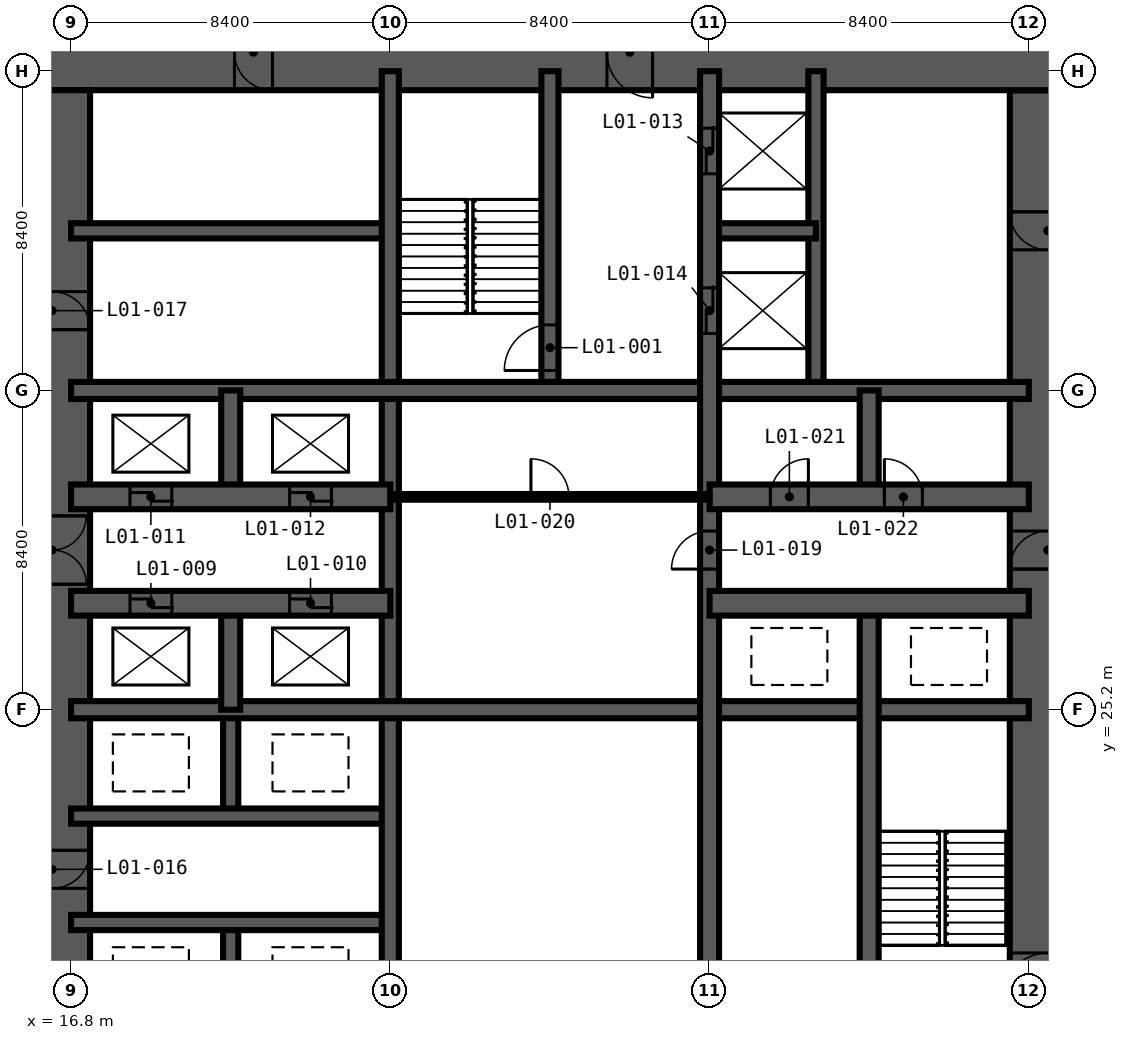
"""IFC4 building model, lengths in metres.
Left out: names, types, materials, properties, quantities, classifications, styles, units other than length and angle.
Written with IfcOpenShell. Run it as: python <this file> out.ifc"""

import sys

from ifc_helpers import new_model, si_unit, direction, frame, frame_2d, origin, place, context, subcontext, project, spatial, rectangle, extrude, element, fill, save


model = new_model("IFC4")
c1 = context("Model", 3, precision=1e-05, world=origin(), true_north=direction((0.0, 1.0)))
c2 = subcontext(c1, "Body", "Model", "MODEL_VIEW")
j1 = project(units=[si_unit("LENGTHUNIT", "METRE"), si_unit("PLANEANGLEUNIT", "RADIAN")], contexts=[c1])
p1 = place(None, origin())
s1 = spatial("IfcSite", under=j1, at=p1, CompositionType="ELEMENT")
p2 = place(p1, origin())
s2 = spatial("IfcBuilding", under=s1, at=p2, CompositionType="ELEMENT")
p3 = place(p2, frame((0.0, 0.0, 6.0)))
s3 = spatial("IfcBuildingStorey", under=s2, at=p3, CompositionType="ELEMENT", Elevation=6.0)
p4 = place(p3, frame((42.5, 17.3, -0.3), z_axis=(0.0, 0.0, 1.0), x_axis=(0.0, 1.0, 0.0)))
e1 = element("IfcWall", 1, at=p4, inside=s3, PredefinedType="SHEAR", context=c2, shape_type="SweptSolid", body=[
    extrude(rectangle(XDim=24.2, YDim=2.0, at=frame_2d((12.1, 0.0))), origin(), (0.0, 0.0, 1.0), 6.0),
])
p5 = place(p4, frame((0.3, 0.0, 0.3)))
e2 = element("IfcOpeningElement", 2, at=p5, cuts=e1, PredefinedType="OPENING", context=c2, shape_type="SweptSolid", body=[
    extrude(rectangle(XDim=1.2, YDim=2.2, at=frame_2d((0.6, 1.1))), frame((0.0, 1.01, 0.0), z_axis=(0.0, -1.0, 0.0), x_axis=(1.0, 0.0, 0.0)), (0.0, 0.0, 1.0), 2.02),
])
p6 = place(p4, frame((11.6, 0.0, 0.3)))
e3 = element("IfcOpeningElement", 3, at=p6, cuts=e1, PredefinedType="OPENING", context=c2, shape_type="SweptSolid", body=[
    extrude(rectangle(XDim=1.0, YDim=2.1, at=frame_2d((0.5, 1.05))), frame((0.0, 1.01, 0.0), z_axis=(0.0, -1.0, 0.0), x_axis=(1.0, 0.0, 0.0)), (0.0, 0.0, 1.0), 2.02),
])
p7 = place(p4, frame((20.0, 0.0, 0.3)))
e4 = element("IfcOpeningElement", 4, at=p7, cuts=e1, PredefinedType="OPENING", context=c2, shape_type="SweptSolid", body=[
    extrude(rectangle(XDim=1.0, YDim=2.1, at=frame_2d((0.5, 1.05))), frame((0.0, 1.01, 0.0), z_axis=(0.0, -1.0, 0.0), x_axis=(1.0, 0.0, 0.0)), (0.0, 0.0, 1.0), 2.02),
])
p8 = place(p3, frame((43.5, 42.5, -0.3), z_axis=(0.0, 0.0, 1.0), x_axis=(-1.0, 0.0, 0.0)))
e5 = element("IfcWall", 5, at=p8, inside=s3, PredefinedType="SHEAR", context=c2, shape_type="SweptSolid", body=[
    extrude(rectangle(XDim=28.2, YDim=2.0, at=frame_2d((14.1, 0.0))), origin(), (0.0, 0.0, 1.0), 6.0),
])
p9 = place(p8, frame((21.4, 0.0, 0.3)))
e6 = element("IfcOpeningElement", 6, at=p9, cuts=e5, PredefinedType="OPENING", context=c2, shape_type="SweptSolid", body=[
    extrude(rectangle(XDim=1.0, YDim=2.1, at=frame_2d((0.5, 1.05))), frame((0.0, 1.01, 0.0), z_axis=(0.0, -1.0, 0.0), x_axis=(1.0, 0.0, 0.0)), (0.0, 0.0, 1.0), 2.02),
])
p10 = place(p8, frame((11.4, 0.0, 0.3)))
e7 = element("IfcOpeningElement", 7, at=p10, cuts=e5, PredefinedType="OPENING", context=c2, shape_type="SweptSolid", body=[
    extrude(rectangle(XDim=1.2, YDim=2.2, at=frame_2d((0.6, 1.1))), frame((0.0, 1.01, 0.0), z_axis=(0.0, -1.0, 0.0), x_axis=(1.0, 0.0, 0.0)), (0.0, 0.0, 1.0), 2.02),
])
p11 = place(p3, frame((16.3, 41.5, -0.3), z_axis=(0.0, 0.0, 1.0), x_axis=(0.0, -1.0, 0.0)))
e8 = element("IfcWall", 8, at=p11, inside=s3, PredefinedType="SHEAR", context=c2, shape_type="SweptSolid", body=[
    extrude(rectangle(XDim=24.2, YDim=2.0, at=frame_2d((12.1, 0.0))), origin(), (0.0, 0.0, 1.0), 6.0),
])
p12 = place(p11, frame((11.2, 0.0, 0.3)))
e9 = element("IfcOpeningElement", 9, at=p12, cuts=e8, PredefinedType="OPENING", context=c2, shape_type="SweptSolid", body=[
    extrude(rectangle(XDim=1.8, YDim=2.2, at=frame_2d((0.9, 1.1))), frame((0.0, 1.01, 0.0), z_axis=(0.0, -1.0, 0.0), x_axis=(1.0, 0.0, 0.0)), (0.0, 0.0, 1.0), 2.02),
])
p13 = place(p11, frame((20.0, 0.0, 0.3)))
e10 = element("IfcOpeningElement", 10, at=p13, cuts=e8, PredefinedType="OPENING", context=c2, shape_type="SweptSolid", body=[
    extrude(rectangle(XDim=1.0, YDim=2.1, at=frame_2d((0.5, 1.05))), frame((0.0, 1.01, 0.0), z_axis=(0.0, -1.0, 0.0), x_axis=(1.0, 0.0, 0.0)), (0.0, 0.0, 1.0), 2.02),
])
p14 = place(p11, frame((5.3, 0.0, 0.3)))
e11 = element("IfcOpeningElement", 11, at=p14, cuts=e8, PredefinedType="OPENING", context=c2, shape_type="SweptSolid", body=[
    extrude(rectangle(XDim=1.0, YDim=2.1, at=frame_2d((0.5, 1.05))), frame((0.0, 1.01, 0.0), z_axis=(0.0, -1.0, 0.0), x_axis=(1.0, 0.0, 0.0)), (0.0, 0.0, 1.0), 2.02),
])
for number, where, z_axis, x_axis in (
    (12, (21.0, 16.8, -0.3), (0.0, 0.0, 1.0), (0.0, 1.0, 0.0)),
    (13, (21.0, 22.4, -0.3), (0.0, 0.0, 1.0), (0.0, 1.0, 0.0)),
):
    element("IfcWall", number, at=place(p3, frame(where, z_axis=z_axis, x_axis=x_axis)), inside=s3, PredefinedType="SHEAR", context=c2, shape_type="SweptSolid", body=[
        extrude(rectangle(XDim=2.8, YDim=0.4, at=frame_2d((1.4, 0.0))), origin(), (0.0, 0.0, 1.0), 6.0),
    ])
for number, where, z_axis, x_axis in (
    (14, (36.4, 33.6, -0.3), (0.0, 0.0, 1.0), (0.0, 1.0, 0.0)),
    (15, (16.8, 19.6, -0.3), (0.0, 0.0, 1.0), (1.0, 0.0, 0.0)),
    (16, (16.8, 22.4, -0.3), (0.0, 0.0, 1.0), (1.0, 0.0, 0.0)),
    (17, (16.8, 37.8, -0.3), (0.0, 0.0, 1.0), (1.0, 0.0, 0.0)),
):
    element("IfcWall", number, at=place(p3, frame(where, z_axis=z_axis, x_axis=x_axis)), inside=s3, PredefinedType="SHEAR", context=c2, shape_type="SweptSolid", body=[
        extrude(rectangle(XDim=8.4, YDim=0.4, at=frame_2d((4.2, 0.0))), origin(), (0.0, 0.0, 1.0), 6.0),
    ])
p15 = place(p3, frame((33.6, 37.8, -0.3), z_axis=(0.0, 0.0, 1.0), x_axis=(1.0, 0.0, 0.0)))
e18 = element("IfcWall", 18, at=p15, inside=s3, PredefinedType="SHEAR", context=c2, shape_type="SweptSolid", body=[
    extrude(rectangle(XDim=2.8, YDim=0.4, at=frame_2d((1.4, 0.0))), origin(), (0.0, 0.0, 1.0), 6.0),
])
p16 = place(p3, frame((25.2, 16.8, -0.3), z_axis=(0.0, 0.0, 1.0), x_axis=(0.0, 1.0, 0.0)))
e19 = element("IfcWall", 19, at=p16, inside=s3, PredefinedType="SHEAR", context=c2, shape_type="SweptSolid", body=[
    extrude(rectangle(XDim=25.2, YDim=0.45, at=frame_2d((12.6, 0.0))), origin(), (0.0, 0.0, 1.0), 6.0),
])
p17 = place(p3, frame((29.4, 33.6, -0.3), z_axis=(0.0, 0.0, 1.0), x_axis=(0.0, 1.0, 0.0)))
e20 = element("IfcWall", 20, at=p17, inside=s3, PredefinedType="SHEAR", context=c2, shape_type="SweptSolid", body=[
    extrude(rectangle(XDim=8.4, YDim=0.45, at=frame_2d((4.2, 0.0))), origin(), (0.0, 0.0, 1.0), 6.0),
])
p18 = place(p17, frame((0.525, 0.0, 0.3)))
e21 = element("IfcOpeningElement", 21, at=p18, cuts=e20, PredefinedType="OPENING", context=c2, shape_type="SweptSolid", body=[
    extrude(rectangle(XDim=1.2, YDim=2.2, at=frame_2d((0.6, 1.1))), frame((0.0, 0.235, 0.0), z_axis=(0.0, -1.0, 0.0), x_axis=(1.0, 0.0, 0.0)), (0.0, 0.0, 1.0), 0.47),
])
for number, where, z_axis, x_axis in (
    (22, (16.8, 25.2, -0.3), (0.0, 0.0, 1.0), (1.0, 0.0, 0.0)),
    (23, (16.8, 33.6, -0.3), (0.0, 0.0, 1.0), (1.0, 0.0, 0.0)),
):
    element("IfcWall", number, at=place(p3, frame(where, z_axis=z_axis, x_axis=x_axis)), inside=s3, PredefinedType="SHEAR", context=c2, shape_type="SweptSolid", body=[
        extrude(rectangle(XDim=25.2, YDim=0.45, at=frame_2d((12.6, 0.0))), origin(), (0.0, 0.0, 1.0), 6.0),
    ])
for number, where, z_axis, x_axis in (
    (24, (21.0, 25.2, -0.3), (0.0, 0.0, 1.0), (0.0, 1.0, 0.0)),
    (25, (21.0, 30.8, -0.3), (0.0, 0.0, 1.0), (0.0, 1.0, 0.0)),
):
    element("IfcWall", number, at=place(p3, frame(where, z_axis=z_axis, x_axis=x_axis)), inside=s3, PredefinedType="SHEAR", context=c2, shape_type="SweptSolid", body=[
        extrude(rectangle(XDim=2.8, YDim=0.5, at=frame_2d((1.4, 0.0))), origin(), (0.0, 0.0, 1.0), 6.0),
    ])
p19 = place(p3, frame((33.6, 16.8, -0.3), z_axis=(0.0, 0.0, 1.0), x_axis=(0.0, 1.0, 0.0)))
e26 = element("IfcWall", 26, at=p19, inside=s3, PredefinedType="SHEAR", context=c2, shape_type="SweptSolid", body=[
    extrude(rectangle(XDim=25.2, YDim=0.5, at=frame_2d((12.6, 0.0))), origin(), (0.0, 0.0, 1.0), 6.0),
])
p20 = place(p19, frame((22.5, 0.0, 0.3)))
e27 = element("IfcOpeningElement", 27, at=p20, cuts=e26, PredefinedType="OPENING", context=c2, shape_type="SweptSolid", body=[
    extrude(rectangle(XDim=1.2, YDim=2.2, at=frame_2d((0.6, 1.1))), frame((0.0, 0.26, 0.0), z_axis=(0.0, -1.0, 0.0), x_axis=(1.0, 0.0, 0.0)), (0.0, 0.0, 1.0), 0.52),
])
p21 = place(p19, frame((18.3, 0.0, 0.3)))
e28 = element("IfcOpeningElement", 28, at=p21, cuts=e26, PredefinedType="OPENING", context=c2, shape_type="SweptSolid", body=[
    extrude(rectangle(XDim=1.2, YDim=2.2, at=frame_2d((0.6, 1.1))), frame((0.0, 0.26, 0.0), z_axis=(0.0, -1.0, 0.0), x_axis=(1.0, 0.0, 0.0)), (0.0, 0.0, 1.0), 0.52),
])
p22 = place(p19, frame((12.1, 0.0, 0.3)))
e29 = element("IfcOpeningElement", 29, at=p22, cuts=e26, PredefinedType="OPENING", context=c2, shape_type="SweptSolid", body=[
    extrude(rectangle(XDim=1.0, YDim=2.1, at=frame_2d((0.5, 1.05))), frame((0.0, 0.26, 0.0), z_axis=(0.0, -1.0, 0.0), x_axis=(1.0, 0.0, 0.0)), (0.0, 0.0, 1.0), 0.52),
])
p23 = place(p3, frame((37.8, 16.8, -0.3), z_axis=(0.0, 0.0, 1.0), x_axis=(0.0, 1.0, 0.0)))
e30 = element("IfcWall", 30, at=p23, inside=s3, PredefinedType="SHEAR", context=c2, shape_type="SweptSolid", body=[
    extrude(rectangle(XDim=11.2, YDim=0.5, at=frame_2d((5.6, 0.0))), origin(), (0.0, 0.0, 1.0), 6.0),
])
p24 = place(p3, frame((37.8, 30.8, -0.3), z_axis=(0.0, 0.0, 1.0), x_axis=(0.0, 1.0, 0.0)))
e31 = element("IfcWall", 31, at=p24, inside=s3, PredefinedType="SHEAR", context=c2, shape_type="SweptSolid", body=[
    extrude(rectangle(XDim=2.8, YDim=0.5, at=frame_2d((1.4, 0.0))), origin(), (0.0, 0.0, 1.0), 6.0),
])
p25 = place(p3, frame((16.8, 28.0, -0.3), z_axis=(0.0, 0.0, 1.0), x_axis=(1.0, 0.0, 0.0)))
e32 = element("IfcWall", 32, at=p25, inside=s3, PredefinedType="SHEAR", context=c2, shape_type="SweptSolid", body=[
    extrude(rectangle(XDim=8.4, YDim=0.65, at=frame_2d((4.2, 0.0))), origin(), (0.0, 0.0, 1.0), 6.0),
])
p26 = place(p25, frame((1.55, 0.0, 0.3)))
e33 = element("IfcOpeningElement", 33, at=p26, cuts=e32, PredefinedType="OPENING", context=c2, shape_type="SweptSolid", body=[
    extrude(rectangle(XDim=1.1, YDim=2.2, at=frame_2d((0.55, 1.1))), frame((0.0, 0.335, 0.0), z_axis=(0.0, -1.0, 0.0), x_axis=(1.0, 0.0, 0.0)), (0.0, 0.0, 1.0), 0.67),
])
p27 = place(p25, frame((5.75, 0.0, 0.3)))
e34 = element("IfcOpeningElement", 34, at=p27, cuts=e32, PredefinedType="OPENING", context=c2, shape_type="SweptSolid", body=[
    extrude(rectangle(XDim=1.1, YDim=2.2, at=frame_2d((0.55, 1.1))), frame((0.0, 0.335, 0.0), z_axis=(0.0, -1.0, 0.0), x_axis=(1.0, 0.0, 0.0)), (0.0, 0.0, 1.0), 0.67),
])
p28 = place(p3, frame((33.6, 28.0, -0.3), z_axis=(0.0, 0.0, 1.0), x_axis=(1.0, 0.0, 0.0)))
e35 = element("IfcWall", 35, at=p28, inside=s3, PredefinedType="SHEAR", context=c2, shape_type="SweptSolid", body=[
    extrude(rectangle(XDim=8.4, YDim=0.65, at=frame_2d((4.2, 0.0))), origin(), (0.0, 0.0, 1.0), 6.0),
])
p29 = place(p3, frame((16.8, 30.8, -0.3), z_axis=(0.0, 0.0, 1.0), x_axis=(1.0, 0.0, 0.0)))
e36 = element("IfcWall", 36, at=p29, inside=s3, PredefinedType="SHEAR", context=c2, shape_type="SweptSolid", body=[
    extrude(rectangle(XDim=8.4, YDim=0.65, at=frame_2d((4.2, 0.0))), origin(), (0.0, 0.0, 1.0), 6.0),
])
p30 = place(p29, frame((1.55, 0.0, 0.3)))
e37 = element("IfcOpeningElement", 37, at=p30, cuts=e36, PredefinedType="OPENING", context=c2, shape_type="SweptSolid", body=[
    extrude(rectangle(XDim=1.1, YDim=2.2, at=frame_2d((0.55, 1.1))), frame((0.0, 0.335, 0.0), z_axis=(0.0, -1.0, 0.0), x_axis=(1.0, 0.0, 0.0)), (0.0, 0.0, 1.0), 0.67),
])
p31 = place(p29, frame((5.75, 0.0, 0.3)))
e38 = element("IfcOpeningElement", 38, at=p31, cuts=e36, PredefinedType="OPENING", context=c2, shape_type="SweptSolid", body=[
    extrude(rectangle(XDim=1.1, YDim=2.2, at=frame_2d((0.55, 1.1))), frame((0.0, 0.335, 0.0), z_axis=(0.0, -1.0, 0.0), x_axis=(1.0, 0.0, 0.0)), (0.0, 0.0, 1.0), 0.67),
])
p32 = place(p3, frame((33.6, 30.8, -0.3), z_axis=(0.0, 0.0, 1.0), x_axis=(1.0, 0.0, 0.0)))
e39 = element("IfcWall", 39, at=p32, inside=s3, PredefinedType="SHEAR", context=c2, shape_type="SweptSolid", body=[
    extrude(rectangle(XDim=8.4, YDim=0.65, at=frame_2d((4.2, 0.0))), origin(), (0.0, 0.0, 1.0), 6.0),
])
p33 = place(p32, frame((1.6, 0.0, 0.3)))
e40 = element("IfcOpeningElement", 40, at=p33, cuts=e39, PredefinedType="OPENING", context=c2, shape_type="SweptSolid", body=[
    extrude(rectangle(XDim=1.0, YDim=2.1, at=frame_2d((0.5, 1.05))), frame((0.0, 0.335, 0.0), z_axis=(0.0, -1.0, 0.0), x_axis=(1.0, 0.0, 0.0)), (0.0, 0.0, 1.0), 0.67),
])
p34 = place(p32, frame((4.6, 0.0, 0.3)))
e41 = element("IfcOpeningElement", 41, at=p34, cuts=e39, PredefinedType="OPENING", context=c2, shape_type="SweptSolid", body=[
    extrude(rectangle(XDim=1.0, YDim=2.1, at=frame_2d((0.5, 1.05))), frame((0.0, 0.335, 0.0), z_axis=(0.0, -1.0, 0.0), x_axis=(1.0, 0.0, 0.0)), (0.0, 0.0, 1.0), 0.67),
])
p35 = place(p3, frame((25.2, 30.8, 0.0), z_axis=(0.0, 0.0, 1.0), x_axis=(1.0, 0.0, 0.0)))
e42 = element("IfcWall", 42, at=p35, inside=s3, PredefinedType="PARTITIONING", context=c2, shape_type="SweptSolid", body=[
    extrude(rectangle(XDim=8.4, YDim=0.15, at=frame_2d((4.2, 0.0))), origin(), (0.0, 0.0, 1.0), 5.7),
])
p36 = place(p35, frame((3.7, 0.0, 0.0)))
e43 = element("IfcOpeningElement", 43, at=p36, cuts=e42, PredefinedType="OPENING", context=c2, shape_type="SweptSolid", body=[
    extrude(rectangle(XDim=1.0, YDim=2.1, at=frame_2d((0.5, 1.05))), frame((0.0, 0.085, 0.0), z_axis=(0.0, -1.0, 0.0), x_axis=(1.0, 0.0, 0.0)), (0.0, 0.0, 1.0), 0.17),
])
p37 = place(p18, origin())
e44 = element("IfcDoor", 44, at=p37, inside=s3, OperationType="SINGLE_SWING_LEFT", PredefinedType="DOOR", context=c2, shape_type="SweptSolid", body=[
    extrude(rectangle(XDim=1.2, YDim=2.2, at=frame_2d((0.6, 1.1))), frame((0.0, 0.025, 0.0), z_axis=(0.0, -1.0, 0.0), x_axis=(1.0, 0.0, 0.0)), (0.0, 0.0, 1.0), 0.05),
])
fill(e21, e44)
p38 = place(p5, origin())
e45 = element("IfcDoor", 45, at=p38, inside=s3, OperationType="SINGLE_SWING_LEFT", PredefinedType="DOOR", context=c2, shape_type="SweptSolid", body=[
    extrude(rectangle(XDim=1.2, YDim=2.2, at=frame_2d((0.6, 1.1))), frame((0.0, 0.025, 0.0), z_axis=(0.0, -1.0, 0.0), x_axis=(1.0, 0.0, 0.0)), (0.0, 0.0, 1.0), 0.05),
])
fill(e2, e45)
p39 = place(p26, origin())
e46 = element("IfcDoor", 46, at=p39, inside=s3, OperationType="DOUBLE_DOOR_SLIDING", PredefinedType="DOOR", context=c2, shape_type="SweptSolid", body=[
    extrude(rectangle(XDim=1.1, YDim=2.2, at=frame_2d((0.55, 1.1))), frame((0.0, 0.025, 0.0), z_axis=(0.0, -1.0, 0.0), x_axis=(1.0, 0.0, 0.0)), (0.0, 0.0, 1.0), 0.05),
])
fill(e33, e46)
p40 = place(p27, origin())
e47 = element("IfcDoor", 47, at=p40, inside=s3, OperationType="DOUBLE_DOOR_SLIDING", PredefinedType="DOOR", context=c2, shape_type="SweptSolid", body=[
    extrude(rectangle(XDim=1.1, YDim=2.2, at=frame_2d((0.55, 1.1))), frame((0.0, 0.025, 0.0), z_axis=(0.0, -1.0, 0.0), x_axis=(1.0, 0.0, 0.0)), (0.0, 0.0, 1.0), 0.05),
])
fill(e34, e47)
p41 = place(p30, origin())
e48 = element("IfcDoor", 48, at=p41, inside=s3, OperationType="DOUBLE_DOOR_SLIDING", PredefinedType="DOOR", context=c2, shape_type="SweptSolid", body=[
    extrude(rectangle(XDim=1.1, YDim=2.2, at=frame_2d((0.55, 1.1))), frame((0.0, 0.025, 0.0), z_axis=(0.0, -1.0, 0.0), x_axis=(1.0, 0.0, 0.0)), (0.0, 0.0, 1.0), 0.05),
])
fill(e37, e48)
p42 = place(p31, origin())
e49 = element("IfcDoor", 49, at=p42, inside=s3, OperationType="DOUBLE_DOOR_SLIDING", PredefinedType="DOOR", context=c2, shape_type="SweptSolid", body=[
    extrude(rectangle(XDim=1.1, YDim=2.2, at=frame_2d((0.55, 1.1))), frame((0.0, 0.025, 0.0), z_axis=(0.0, -1.0, 0.0), x_axis=(1.0, 0.0, 0.0)), (0.0, 0.0, 1.0), 0.05),
])
fill(e38, e49)
p43 = place(p20, origin())
e50 = element("IfcDoor", 50, at=p43, inside=s3, OperationType="DOUBLE_DOOR_SLIDING", PredefinedType="DOOR", context=c2, shape_type="SweptSolid", body=[
    extrude(rectangle(XDim=1.2, YDim=2.2, at=frame_2d((0.6, 1.1))), frame((0.0, 0.025, 0.0), z_axis=(0.0, -1.0, 0.0), x_axis=(1.0, 0.0, 0.0)), (0.0, 0.0, 1.0), 0.05),
])
fill(e27, e50)
p44 = place(p21, origin())
e51 = element("IfcDoor", 51, at=p44, inside=s3, OperationType="DOUBLE_DOOR_SLIDING", PredefinedType="DOOR", context=c2, shape_type="SweptSolid", body=[
    extrude(rectangle(XDim=1.2, YDim=2.2, at=frame_2d((0.6, 1.1))), frame((0.0, 0.025, 0.0), z_axis=(0.0, -1.0, 0.0), x_axis=(1.0, 0.0, 0.0)), (0.0, 0.0, 1.0), 0.05),
])
fill(e28, e51)
p45 = place(p12, origin())
e52 = element("IfcDoor", 52, at=p45, inside=s3, OperationType="DOUBLE_DOOR_DOUBLE_SWING", PredefinedType="DOOR", context=c2, shape_type="SweptSolid", body=[
    extrude(rectangle(XDim=1.8, YDim=2.2, at=frame_2d((0.9, 1.1))), frame((0.0, 0.025, 0.0), z_axis=(0.0, -1.0, 0.0), x_axis=(1.0, 0.0, 0.0)), (0.0, 0.0, 1.0), 0.05),
])
fill(e9, e52)
p46 = place(p13, origin())
e53 = element("IfcDoor", 53, at=p46, inside=s3, OperationType="SINGLE_SWING_LEFT", PredefinedType="DOOR", context=c2, shape_type="SweptSolid", body=[
    extrude(rectangle(XDim=1.0, YDim=2.1, at=frame_2d((0.5, 1.05))), frame((0.0, 0.025, 0.0), z_axis=(0.0, -1.0, 0.0), x_axis=(1.0, 0.0, 0.0)), (0.0, 0.0, 1.0), 0.05),
])
fill(e10, e53)
p47 = place(p14, origin())
e54 = element("IfcDoor", 54, at=p47, inside=s3, OperationType="SINGLE_SWING_RIGHT", PredefinedType="DOOR", context=c2, shape_type="SweptSolid", body=[
    extrude(rectangle(XDim=1.0, YDim=2.1, at=frame_2d((0.5, 1.05))), frame((0.0, 0.025, 0.0), z_axis=(0.0, -1.0, 0.0), x_axis=(1.0, 0.0, 0.0)), (0.0, 0.0, 1.0), 0.05),
])
fill(e11, e54)
p48 = place(p9, origin())
e55 = element("IfcDoor", 55, at=p48, inside=s3, OperationType="SINGLE_SWING_LEFT", PredefinedType="DOOR", context=c2, shape_type="SweptSolid", body=[
    extrude(rectangle(XDim=1.0, YDim=2.1, at=frame_2d((0.5, 1.05))), frame((0.0, 0.025, 0.0), z_axis=(0.0, -1.0, 0.0), x_axis=(1.0, 0.0, 0.0)), (0.0, 0.0, 1.0), 0.05),
])
fill(e6, e55)
p49 = place(p22, origin())
e56 = element("IfcDoor", 56, at=p49, inside=s3, OperationType="SINGLE_SWING_LEFT", PredefinedType="DOOR", context=c2, shape_type="SweptSolid", body=[
    extrude(rectangle(XDim=1.0, YDim=2.1, at=frame_2d((0.5, 1.05))), frame((0.0, 0.025, 0.0), z_axis=(0.0, -1.0, 0.0), x_axis=(1.0, 0.0, 0.0)), (0.0, 0.0, 1.0), 0.05),
])
fill(e29, e56)
p50 = place(p36, origin())
e57 = element("IfcDoor", 57, at=p50, inside=s3, OperationType="SINGLE_SWING_LEFT", PredefinedType="DOOR", context=c2, shape_type="SweptSolid", body=[
    extrude(rectangle(XDim=1.0, YDim=2.1, at=frame_2d((0.5, 1.05))), frame((0.0, 0.025, 0.0), z_axis=(0.0, -1.0, 0.0), x_axis=(1.0, 0.0, 0.0)), (0.0, 0.0, 1.0), 0.05),
])
fill(e43, e57)
p51 = place(p33, origin())
e58 = element("IfcDoor", 58, at=p51, inside=s3, OperationType="SINGLE_SWING_RIGHT", PredefinedType="DOOR", context=c2, shape_type="SweptSolid", body=[
    extrude(rectangle(XDim=1.0, YDim=2.1, at=frame_2d((0.5, 1.05))), frame((0.0, 0.025, 0.0), z_axis=(0.0, -1.0, 0.0), x_axis=(1.0, 0.0, 0.0)), (0.0, 0.0, 1.0), 0.05),
])
fill(e40, e58)
p52 = place(p34, origin())
e59 = element("IfcDoor", 59, at=p52, inside=s3, OperationType="SINGLE_SWING_LEFT", PredefinedType="DOOR", context=c2, shape_type="SweptSolid", body=[
    extrude(rectangle(XDim=1.0, YDim=2.1, at=frame_2d((0.5, 1.05))), frame((0.0, 0.025, 0.0), z_axis=(0.0, -1.0, 0.0), x_axis=(1.0, 0.0, 0.0)), (0.0, 0.0, 1.0), 0.05),
])
fill(e41, e59)
p53 = place(p6, origin())
e60 = element("IfcDoor", 60, at=p53, inside=s3, OperationType="SINGLE_SWING_LEFT", PredefinedType="DOOR", context=c2, shape_type="SweptSolid", body=[
    extrude(rectangle(XDim=1.0, YDim=2.1, at=frame_2d((0.5, 1.05))), frame((0.0, 0.025, 0.0), z_axis=(0.0, -1.0, 0.0), x_axis=(1.0, 0.0, 0.0)), (0.0, 0.0, 1.0), 0.05),
])
fill(e3, e60)
p54 = place(p10, origin())
e61 = element("IfcDoor", 61, at=p54, inside=s3, OperationType="SINGLE_SWING_LEFT", PredefinedType="DOOR", context=c2, shape_type="SweptSolid", body=[
    extrude(rectangle(XDim=1.2, YDim=2.2, at=frame_2d((0.6, 1.1))), frame((0.0, 0.025, 0.0), z_axis=(0.0, -1.0, 0.0), x_axis=(1.0, 0.0, 0.0)), (0.0, 0.0, 1.0), 0.05),
])
fill(e7, e61)
p55 = place(p7, origin())
e62 = element("IfcDoor", 62, at=p55, inside=s3, OperationType="SINGLE_SWING_RIGHT", PredefinedType="DOOR", context=c2, shape_type="SweptSolid", body=[
    extrude(rectangle(XDim=1.0, YDim=2.1, at=frame_2d((0.5, 1.05))), frame((0.0, 0.025, 0.0), z_axis=(0.0, -1.0, 0.0), x_axis=(1.0, 0.0, 0.0)), (0.0, 0.0, 1.0), 0.05),
])
fill(e4, e62)
save(model, sys.argv[1])
